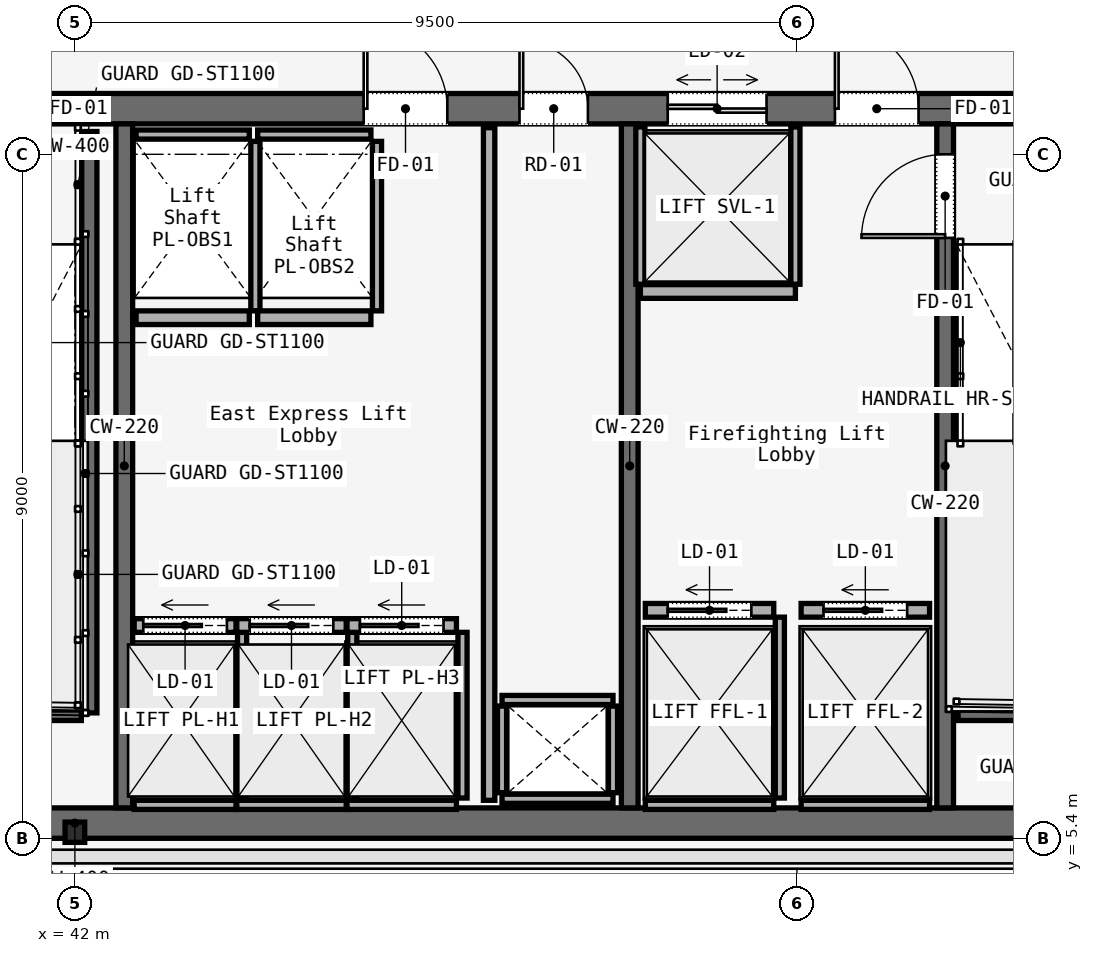
"""IFC4 building model, lengths in metres.
Left out: names, types, materials, properties, quantities, classifications, styles, units other than length and angle.
Written with IfcOpenShell. Run it as: python <this file> out.ifc"""

import sys

from ifc_helpers import new_model, si_unit, direction, frame, frame_2d, origin, origin_2d, place, context, subcontext, project, spatial, rectangle, i_section, extrude, element, fill, save


model = new_model("IFC4")
c1 = context("Model", 3, precision=1e-05, world=origin(), true_north=direction((0.0, 1.0)))
c2 = subcontext(c1, "Body", "Model", "MODEL_VIEW")
j1 = project(units=[si_unit("LENGTHUNIT", "METRE"), si_unit("PLANEANGLEUNIT", "RADIAN")], contexts=[c1])
p1 = place(None, origin())
s1 = spatial("IfcSite", under=j1, at=p1, CompositionType="ELEMENT")
p2 = place(p1, origin())
s2 = spatial("IfcBuilding", under=s1, at=p2, CompositionType="ELEMENT")
p3 = place(p2, frame((0.0, 0.0, 283.3)))
s3 = spatial("IfcBuildingStorey", under=s2, at=p3, CompositionType="ELEMENT", Elevation=283.3)
p4 = place(p3, frame((26.45, 15.0, 0.0), z_axis=(0.0, 0.0, 1.0), x_axis=(1.0, 0.0, 0.0)))
e1 = element("IfcWall", 1, at=p4, inside=s3, PredefinedType="SOLIDWALL", context=c2, shape_type="SweptSolid", body=[
    extrude(rectangle(XDim=31.1, YDim=0.4, at=frame_2d((15.55, 0.0))), origin(), (0.0, 0.0, 1.0), 3.58),
])
p5 = place(p4, frame((1.65, 0.0, 0.0)))
e2 = element("IfcOpeningElement", 2, at=p5, cuts=e1, PredefinedType="OPENING", context=c2, shape_type="SweptSolid", body=[
    extrude(rectangle(XDim=1.1, YDim=2.2, at=frame_2d((0.55, 1.1))), frame((0.0, 0.2, 0.0), z_axis=(0.0, -1.0, 0.0), x_axis=(1.0, 0.0, 0.0)), (0.0, 0.0, 1.0), 0.4),
])
p6 = place(p4, frame((13.65, 0.0, 0.0)))
e3 = element("IfcOpeningElement", 3, at=p6, cuts=e1, PredefinedType="OPENING", context=c2, shape_type="SweptSolid", body=[
    extrude(rectangle(XDim=1.1, YDim=2.2, at=frame_2d((0.55, 1.1))), frame((0.0, 0.2, 0.0), z_axis=(0.0, -1.0, 0.0), x_axis=(1.0, 0.0, 0.0)), (0.0, 0.0, 1.0), 0.4),
])
p7 = place(p4, frame((25.55, 0.0, 0.0)))
e4 = element("IfcOpeningElement", 4, at=p7, cuts=e1, PredefinedType="OPENING", context=c2, shape_type="SweptSolid", body=[
    extrude(rectangle(XDim=1.1, YDim=2.2, at=frame_2d((0.55, 1.1))), frame((0.0, 0.2, 0.0), z_axis=(0.0, -1.0, 0.0), x_axis=(1.0, 0.0, 0.0)), (0.0, 0.0, 1.0), 0.4),
])
p8 = place(p4, frame((19.35, 0.0, 0.0)))
e5 = element("IfcOpeningElement", 5, at=p8, cuts=e1, PredefinedType="OPENING", context=c2, shape_type="SweptSolid", body=[
    extrude(rectangle(XDim=1.1, YDim=2.2, at=frame_2d((0.55, 1.1))), frame((0.0, 0.2, 0.0), z_axis=(0.0, -1.0, 0.0), x_axis=(1.0, 0.0, 0.0)), (0.0, 0.0, 1.0), 0.4),
])
p9 = place(p4, frame((21.4, 0.0, 0.0)))
e6 = element("IfcOpeningElement", 6, at=p9, cuts=e1, PredefinedType="OPENING", context=c2, shape_type="SweptSolid", body=[
    extrude(rectangle(XDim=0.9, YDim=2.1, at=frame_2d((0.45, 1.05))), frame((0.0, 0.2, 0.0), z_axis=(0.0, -1.0, 0.0), x_axis=(1.0, 0.0, 0.0)), (0.0, 0.0, 1.0), 0.4),
])
p10 = place(p4, frame((6.54, 0.0, 0.0)))
e7 = element("IfcOpeningElement", 7, at=p10, cuts=e1, PredefinedType="OPENING", context=c2, shape_type="SweptSolid", body=[
    extrude(rectangle(XDim=0.95, YDim=2.2, at=frame_2d((0.475, 1.1))), frame((0.0, 0.2, 0.0), z_axis=(0.0, -1.0, 0.0), x_axis=(1.0, 0.0, 0.0)), (0.0, 0.0, 1.0), 0.4),
])
p11 = place(p4, frame((10.49, 0.0, 0.0)))
e8 = element("IfcOpeningElement", 8, at=p11, cuts=e1, PredefinedType="OPENING", context=c2, shape_type="SweptSolid", body=[
    extrude(rectangle(XDim=0.95, YDim=2.2, at=frame_2d((0.475, 1.1))), frame((0.0, 0.2, 0.0), z_axis=(0.0, -1.0, 0.0), x_axis=(1.0, 0.0, 0.0)), (0.0, 0.0, 1.0), 0.4),
])
p12 = place(p4, frame((23.35, 0.0, 0.0)))
e9 = element("IfcOpeningElement", 9, at=p12, cuts=e1, PredefinedType="OPENING", context=c2, shape_type="SweptSolid", body=[
    extrude(rectangle(XDim=1.3, YDim=2.3, at=frame_2d((0.65, 1.15))), frame((0.0, 0.2, 0.0), z_axis=(0.0, -1.0, 0.0), x_axis=(1.0, 0.0, 0.0)), (0.0, 0.0, 1.0), 0.4),
])
p13 = place(p3, frame((26.45, 5.6, 0.0), z_axis=(0.0, 0.0, 1.0), x_axis=(1.0, 0.0, 0.0)))
e10 = element("IfcWall", 10, at=p13, inside=s3, PredefinedType="SOLIDWALL", context=c2, shape_type="SweptSolid", body=[
    extrude(rectangle(XDim=31.1, YDim=0.4, at=frame_2d((15.55, 0.0))), origin(), (0.0, 0.0, 1.0), 3.58),
])
for number, where, z_axis, x_axis in (
    (11, (42.65, 5.8, 0.0), (0.0, 0.0, 1.0), (0.0, 1.0, 0.0)),
    (12, (49.3, 5.8, 0.0), (0.0, 0.0, 1.0), (0.0, 1.0, 0.0)),
):
    element("IfcWall", number, at=place(p3, frame(where, z_axis=z_axis, x_axis=x_axis)), inside=s3, PredefinedType="SOLIDWALL", context=c2, shape_type="SweptSolid", body=[
        extrude(rectangle(XDim=9.0, YDim=0.22, at=frame_2d((4.5, 0.0))), origin(), (0.0, 0.0, 1.0), 3.58),
    ])
p14 = place(p3, frame((53.45, 5.8, 0.0), z_axis=(0.0, 0.0, 1.0), x_axis=(0.0, 1.0, 0.0)))
e13 = element("IfcWall", 13, at=p14, inside=s3, PredefinedType="SOLIDWALL", context=c2, shape_type="SweptSolid", body=[
    extrude(rectangle(XDim=9.0, YDim=0.22, at=frame_2d((4.5, 0.0))), origin(), (0.0, 0.0, 1.0), 3.58),
])
p15 = place(p14, frame((7.5, 0.0, 0.0)))
e14 = element("IfcOpeningElement", 14, at=p15, cuts=e13, PredefinedType="OPENING", context=c2, shape_type="SweptSolid", body=[
    extrude(rectangle(XDim=1.1, YDim=2.2, at=frame_2d((0.55, 1.1))), frame((0.0, 0.11, 0.0), z_axis=(0.0, -1.0, 0.0), x_axis=(1.0, 0.0, 0.0)), (0.0, 0.0, 1.0), 0.22),
])
p16 = place(p3, frame((42.0, 5.48, 0.0), z_axis=(0.0, 0.0, 1.0), x_axis=(1.0, 0.0, 0.0)))
e15 = element("IfcColumn", 15, at=p16, inside=s3, PredefinedType="COLUMN", context=c2, shape_type="SweptSolid", body=[
    extrude(i_section(OverallWidth=0.259, OverallDepth=0.267, WebThickness=0.013, FlangeThickness=0.021, FilletRadius=0.013, at=origin_2d()), origin(), (0.0, 0.0, 1.0), 3.58),
])
p17 = place(p3, frame((42.19, 14.7, 0.0), z_axis=(0.0, 0.0, 1.0), x_axis=(0.0, -1.0, 0.0)))
e16 = element("IfcWall", 16, at=p17, inside=s3, PredefinedType="SOLIDWALL", context=c2, shape_type="SweptSolid", body=[
    extrude(rectangle(XDim=7.65, YDim=0.2, at=frame_2d((3.825, 0.0))), origin(), (0.0, 0.0, 1.0), 3.8),
])
for number, where, z_axis, x_axis in (
    (17, (38.97, 7.05, 0.0), (0.0, 0.0, 1.0), (1.0, 0.0, 0.0)),
    (18, (53.62, 7.05, 0.0), (0.0, 0.0, 1.0), (1.0, 0.0, 0.0)),
):
    element("IfcWall", number, at=place(p3, frame(where, z_axis=z_axis, x_axis=x_axis)), inside=s3, PredefinedType="SOLIDWALL", context=c2, shape_type="SweptSolid", body=[
        extrude(rectangle(XDim=3.115, YDim=0.2, at=frame_2d((1.558, 0.0))), origin(), (0.0, 0.0, 1.0), 3.8),
    ])
for number, where, z_axis, x_axis in (
    (19, (47.62, 5.92, 0.0), (0.0, 0.0, 1.0), (1.0, 0.0, 0.0)),
    (20, (47.62, 7.22, 0.0), (0.0, 0.0, 1.0), (1.0, 0.0, 0.0)),
):
    element("IfcWall", number, at=place(p3, frame(where, z_axis=z_axis, x_axis=x_axis)), inside=s3, PredefinedType="SOLIDWALL", context=c2, shape_type="SweptSolid", body=[
        extrude(rectangle(XDim=1.46, YDim=0.12, at=frame_2d((0.73, 0.0))), origin(), (0.0, 0.0, 1.0), 3.01),
    ])
for number, where, z_axis, x_axis in (
    (21, (47.62, 6.0, 0.0), (0.0, 0.0, 1.0), (0.0, 1.0, 0.0)),
    (22, (49.08, 6.0, 0.0), (0.0, 0.0, 1.0), (0.0, 1.0, 0.0)),
):
    element("IfcWall", number, at=place(p3, frame(where, z_axis=z_axis, x_axis=x_axis)), inside=s3, PredefinedType="SOLIDWALL", context=c2, shape_type="SweptSolid", body=[
        extrude(rectangle(XDim=1.14, YDim=0.12, at=frame_2d((0.57, 0.0))), origin(), (0.0, 0.0, 1.0), 3.01),
    ])
p18 = place(p3, frame((47.45, 5.9, 0.0), z_axis=(0.0, 0.0, 1.0), x_axis=(0.0, 1.0, 0.0)))
e23 = element("IfcWall", 23, at=p18, inside=s3, PredefinedType="PARTITIONING", context=c2, shape_type="SweptSolid", body=[
    extrude(rectangle(XDim=8.85, YDim=0.15, at=frame_2d((4.425, 0.0))), origin(), (0.0, 0.0, 1.0), 3.01),
])
p19 = place(p3, frame((42.78, 8.2, 0.0), z_axis=(0.0, 0.0, 1.0), x_axis=(1.0, 0.0, 0.0)))
e24 = element("IfcWall", 24, at=p19, inside=s3, PredefinedType="SOLIDWALL", context=c2, shape_type="SweptSolid", body=[
    extrude(rectangle(XDim=1.34, YDim=0.18, at=frame_2d((0.67, 0.0))), origin(), (0.0, 0.0, 1.0), 3.01),
])
p20 = place(p19, frame((0.12, 0.0, 0.0)))
e25 = element("IfcOpeningElement", 25, at=p20, cuts=e24, PredefinedType="OPENING", context=c2, shape_type="SweptSolid", body=[
    extrude(rectangle(XDim=1.1, YDim=2.2, at=frame_2d((0.55, 1.1))), frame((0.0, 0.09, 0.0), z_axis=(0.0, -1.0, 0.0), x_axis=(1.0, 0.0, 0.0)), (0.0, 0.0, 1.0), 0.18),
])
p21 = place(p3, frame((42.78, 5.84, 0.0), z_axis=(0.0, 0.0, 1.0), x_axis=(1.0, 0.0, 0.0)))
e26 = element("IfcWall", 26, at=p21, inside=s3, PredefinedType="SOLIDWALL", context=c2, shape_type="SweptSolid", body=[
    extrude(rectangle(XDim=1.34, YDim=0.12, at=frame_2d((0.67, 0.0))), origin(), (0.0, 0.0, 1.0), 3.01),
])
p22 = place(p3, frame((44.2, 5.93, 0.0), z_axis=(0.0, 0.0, 1.0), x_axis=(0.0, 1.0, 0.0)))
e27 = element("IfcWall", 27, at=p22, inside=s3, PredefinedType="SOLIDWALL", context=c2, shape_type="SweptSolid", body=[
    extrude(rectangle(XDim=2.18, YDim=0.12, at=frame_2d((1.09, 0.0))), origin(), (0.0, 0.0, 1.0), 3.01),
])
p23 = place(p3, frame((44.13, 8.2, 0.0), z_axis=(0.0, 0.0, 1.0), x_axis=(1.0, 0.0, 0.0)))
e28 = element("IfcWall", 28, at=p23, inside=s3, PredefinedType="SOLIDWALL", context=c2, shape_type="SweptSolid", body=[
    extrude(rectangle(XDim=1.44, YDim=0.18, at=frame_2d((0.72, 0.0))), origin(), (0.0, 0.0, 1.0), 3.01),
])
p24 = place(p23, frame((0.17, 0.0, 0.0)))
e29 = element("IfcOpeningElement", 29, at=p24, cuts=e28, PredefinedType="OPENING", context=c2, shape_type="SweptSolid", body=[
    extrude(rectangle(XDim=1.1, YDim=2.2, at=frame_2d((0.55, 1.1))), frame((0.0, 0.09, 0.0), z_axis=(0.0, -1.0, 0.0), x_axis=(1.0, 0.0, 0.0)), (0.0, 0.0, 1.0), 0.18),
])
p25 = place(p3, frame((44.13, 5.84, 0.0), z_axis=(0.0, 0.0, 1.0), x_axis=(1.0, 0.0, 0.0)))
e30 = element("IfcWall", 30, at=p25, inside=s3, PredefinedType="SOLIDWALL", context=c2, shape_type="SweptSolid", body=[
    extrude(rectangle(XDim=1.44, YDim=0.12, at=frame_2d((0.72, 0.0))), origin(), (0.0, 0.0, 1.0), 3.01),
])
p26 = place(p3, frame((45.65, 5.93, 0.0), z_axis=(0.0, 0.0, 1.0), x_axis=(0.0, 1.0, 0.0)))
e31 = element("IfcWall", 31, at=p26, inside=s3, PredefinedType="SOLIDWALL", context=c2, shape_type="SweptSolid", body=[
    extrude(rectangle(XDim=2.18, YDim=0.12, at=frame_2d((1.09, 0.0))), origin(), (0.0, 0.0, 1.0), 3.01),
])
p27 = place(p3, frame((45.58, 8.2, 0.0), z_axis=(0.0, 0.0, 1.0), x_axis=(1.0, 0.0, 0.0)))
e32 = element("IfcWall", 32, at=p27, inside=s3, PredefinedType="SOLIDWALL", context=c2, shape_type="SweptSolid", body=[
    extrude(rectangle(XDim=1.44, YDim=0.18, at=frame_2d((0.72, 0.0))), origin(), (0.0, 0.0, 1.0), 3.01),
])
p28 = place(p27, frame((0.17, 0.0, 0.0)))
e33 = element("IfcOpeningElement", 33, at=p28, cuts=e32, PredefinedType="OPENING", context=c2, shape_type="SweptSolid", body=[
    extrude(rectangle(XDim=1.1, YDim=2.2, at=frame_2d((0.55, 1.1))), frame((0.0, 0.09, 0.0), z_axis=(0.0, -1.0, 0.0), x_axis=(1.0, 0.0, 0.0)), (0.0, 0.0, 1.0), 0.18),
])
p29 = place(p3, frame((45.58, 5.84, 0.0), z_axis=(0.0, 0.0, 1.0), x_axis=(1.0, 0.0, 0.0)))
e34 = element("IfcWall", 34, at=p29, inside=s3, PredefinedType="SOLIDWALL", context=c2, shape_type="SweptSolid", body=[
    extrude(rectangle(XDim=1.44, YDim=0.12, at=frame_2d((0.72, 0.0))), origin(), (0.0, 0.0, 1.0), 3.01),
])
p30 = place(p3, frame((47.1, 5.93, 0.0), z_axis=(0.0, 0.0, 1.0), x_axis=(0.0, 1.0, 0.0)))
e35 = element("IfcWall", 35, at=p30, inside=s3, PredefinedType="SOLIDWALL", context=c2, shape_type="SweptSolid", body=[
    extrude(rectangle(XDim=2.18, YDim=0.12, at=frame_2d((1.09, 0.0))), origin(), (0.0, 0.0, 1.0), 3.01),
])
p31 = place(p3, frame((42.805, 12.25, 0.0), z_axis=(0.0, 0.0, 1.0), x_axis=(1.0, 0.0, 0.0)))
e36 = element("IfcWall", 36, at=p31, inside=s3, PredefinedType="SOLIDWALL", context=c2, shape_type="SweptSolid", body=[
    extrude(rectangle(XDim=1.49, YDim=0.18, at=frame_2d((0.745, 0.0))), origin(), (0.0, 0.0, 1.0), 3.01),
])
p32 = place(p3, frame((42.805, 14.66, 0.0), z_axis=(0.0, 0.0, 1.0), x_axis=(1.0, 0.0, 0.0)))
e37 = element("IfcWall", 37, at=p32, inside=s3, PredefinedType="SOLIDWALL", context=c2, shape_type="SweptSolid", body=[
    extrude(rectangle(XDim=1.49, YDim=0.12, at=frame_2d((0.745, 0.0))), origin(), (0.0, 0.0, 1.0), 3.01),
])
p33 = place(p3, frame((44.375, 12.34, 0.0), z_axis=(0.0, 0.0, 1.0), x_axis=(0.0, 1.0, 0.0)))
e38 = element("IfcWall", 38, at=p33, inside=s3, PredefinedType="SOLIDWALL", context=c2, shape_type="SweptSolid", body=[
    extrude(rectangle(XDim=2.23, YDim=0.12, at=frame_2d((1.115, 0.0))), origin(), (0.0, 0.0, 1.0), 3.01),
])
p34 = place(p3, frame((44.405, 12.25, 0.0), z_axis=(0.0, 0.0, 1.0), x_axis=(1.0, 0.0, 0.0)))
e39 = element("IfcWall", 39, at=p34, inside=s3, PredefinedType="SOLIDWALL", context=c2, shape_type="SweptSolid", body=[
    extrude(rectangle(XDim=1.49, YDim=0.18, at=frame_2d((0.745, 0.0))), origin(), (0.0, 0.0, 1.0), 3.01),
])
p35 = place(p3, frame((44.405, 14.66, 0.0), z_axis=(0.0, 0.0, 1.0), x_axis=(1.0, 0.0, 0.0)))
e40 = element("IfcWall", 40, at=p35, inside=s3, PredefinedType="SOLIDWALL", context=c2, shape_type="SweptSolid", body=[
    extrude(rectangle(XDim=1.49, YDim=0.12, at=frame_2d((0.745, 0.0))), origin(), (0.0, 0.0, 1.0), 3.01),
])
p36 = place(p3, frame((45.975, 12.34, 0.0), z_axis=(0.0, 0.0, 1.0), x_axis=(0.0, 1.0, 0.0)))
e41 = element("IfcWall", 41, at=p36, inside=s3, PredefinedType="SOLIDWALL", context=c2, shape_type="SweptSolid", body=[
    extrude(rectangle(XDim=2.23, YDim=0.12, at=frame_2d((1.115, 0.0))), origin(), (0.0, 0.0, 1.0), 3.01),
])
p37 = place(p3, frame((49.505, 8.4, 0.0), z_axis=(0.0, 0.0, 1.0), x_axis=(1.0, 0.0, 0.0)))
e42 = element("IfcWall", 42, at=p37, inside=s3, PredefinedType="SOLIDWALL", context=c2, shape_type="SweptSolid", body=[
    extrude(rectangle(XDim=1.69, YDim=0.18, at=frame_2d((0.845, 0.0))), origin(), (0.0, 0.0, 1.0), 3.01),
])
p38 = place(p37, frame((0.295, 0.0, 0.0)))
e43 = element("IfcOpeningElement", 43, at=p38, cuts=e42, PredefinedType="OPENING", context=c2, shape_type="SweptSolid", body=[
    extrude(rectangle(XDim=1.1, YDim=2.2, at=frame_2d((0.55, 1.1))), frame((0.0, 0.09, 0.0), z_axis=(0.0, -1.0, 0.0), x_axis=(1.0, 0.0, 0.0)), (0.0, 0.0, 1.0), 0.18),
])
p39 = place(p3, frame((49.505, 5.84, 0.0), z_axis=(0.0, 0.0, 1.0), x_axis=(1.0, 0.0, 0.0)))
e44 = element("IfcWall", 44, at=p39, inside=s3, PredefinedType="SOLIDWALL", context=c2, shape_type="SweptSolid", body=[
    extrude(rectangle(XDim=1.69, YDim=0.12, at=frame_2d((0.845, 0.0))), origin(), (0.0, 0.0, 1.0), 3.01),
])
p40 = place(p3, frame((51.275, 5.93, 0.0), z_axis=(0.0, 0.0, 1.0), x_axis=(0.0, 1.0, 0.0)))
e45 = element("IfcWall", 45, at=p40, inside=s3, PredefinedType="SOLIDWALL", context=c2, shape_type="SweptSolid", body=[
    extrude(rectangle(XDim=2.38, YDim=0.12, at=frame_2d((1.19, 0.0))), origin(), (0.0, 0.0, 1.0), 3.01),
])
p41 = place(p3, frame((51.555, 8.4, 0.0), z_axis=(0.0, 0.0, 1.0), x_axis=(1.0, 0.0, 0.0)))
e46 = element("IfcWall", 46, at=p41, inside=s3, PredefinedType="SOLIDWALL", context=c2, shape_type="SweptSolid", body=[
    extrude(rectangle(XDim=1.69, YDim=0.18, at=frame_2d((0.845, 0.0))), origin(), (0.0, 0.0, 1.0), 3.01),
])
p42 = place(p41, frame((0.295, 0.0, 0.0)))
e47 = element("IfcOpeningElement", 47, at=p42, cuts=e46, PredefinedType="OPENING", context=c2, shape_type="SweptSolid", body=[
    extrude(rectangle(XDim=1.1, YDim=2.2, at=frame_2d((0.55, 1.1))), frame((0.0, 0.09, 0.0), z_axis=(0.0, -1.0, 0.0), x_axis=(1.0, 0.0, 0.0)), (0.0, 0.0, 1.0), 0.18),
])
p43 = place(p3, frame((51.555, 5.84, 0.0), z_axis=(0.0, 0.0, 1.0), x_axis=(1.0, 0.0, 0.0)))
e48 = element("IfcWall", 48, at=p43, inside=s3, PredefinedType="SOLIDWALL", context=c2, shape_type="SweptSolid", body=[
    extrude(rectangle(XDim=1.69, YDim=0.12, at=frame_2d((0.845, 0.0))), origin(), (0.0, 0.0, 1.0), 3.01),
])
p44 = place(p3, frame((49.44, 12.595, 0.0), z_axis=(0.0, 0.0, 1.0), x_axis=(1.0, 0.0, 0.0)))
e49 = element("IfcWall", 49, at=p44, inside=s3, PredefinedType="SOLIDWALL", context=c2, shape_type="SweptSolid", body=[
    extrude(rectangle(XDim=2.04, YDim=0.18, at=frame_2d((1.02, 0.0))), origin(), (0.0, 0.0, 1.0), 3.01),
])
for number, where, z_axis, x_axis in (
    (50, (49.44, 12.69, 0.0), (0.0, 0.0, 1.0), (0.0, 1.0, 0.0)),
    (51, (51.48, 12.69, 0.0), (0.0, 0.0, 1.0), (0.0, 1.0, 0.0)),
):
    element("IfcWall", number, at=place(p3, frame(where, z_axis=z_axis, x_axis=x_axis)), inside=s3, PredefinedType="SOLIDWALL", context=c2, shape_type="SweptSolid", body=[
        extrude(rectangle(XDim=2.07, YDim=0.12, at=frame_2d((1.035, 0.0))), origin(), (0.0, 0.0, 1.0), 3.01),
    ])
p45 = place(p7, origin())
e52 = element("IfcDoor", 52, at=p45, inside=s3, OperationType="SINGLE_SWING_RIGHT", PredefinedType="DOOR", context=c2, shape_type="SweptSolid", body=[
    extrude(rectangle(XDim=1.1, YDim=2.2, at=frame_2d((0.55, 1.1))), frame((0.0, 0.025, 0.0), z_axis=(0.0, -1.0, 0.0), x_axis=(1.0, 0.0, 0.0)), (0.0, 0.0, 1.0), 0.05),
])
fill(e4, e52)
p46 = place(p8, origin())
e53 = element("IfcDoor", 53, at=p46, inside=s3, OperationType="SINGLE_SWING_LEFT", PredefinedType="DOOR", context=c2, shape_type="SweptSolid", body=[
    extrude(rectangle(XDim=1.1, YDim=2.2, at=frame_2d((0.55, 1.1))), frame((0.0, 0.025, 0.0), z_axis=(0.0, -1.0, 0.0), x_axis=(1.0, 0.0, 0.0)), (0.0, 0.0, 1.0), 0.05),
])
fill(e5, e53)
p47 = place(p9, origin())
e54 = element("IfcDoor", 54, at=p47, inside=s3, OperationType="SINGLE_SWING_LEFT", PredefinedType="DOOR", context=c2, shape_type="SweptSolid", body=[
    extrude(rectangle(XDim=0.9, YDim=2.1, at=frame_2d((0.45, 1.05))), frame((0.0, 0.025, 0.0), z_axis=(0.0, -1.0, 0.0), x_axis=(1.0, 0.0, 0.0)), (0.0, 0.0, 1.0), 0.05),
])
fill(e6, e54)
p48 = place(p15, origin())
e55 = element("IfcDoor", 55, at=p48, inside=s3, OperationType="SINGLE_SWING_LEFT", PredefinedType="DOOR", context=c2, shape_type="SweptSolid", body=[
    extrude(rectangle(XDim=1.1, YDim=2.2, at=frame_2d((0.55, 1.1))), frame((0.0, 0.025, 0.0), z_axis=(0.0, -1.0, 0.0), x_axis=(1.0, 0.0, 0.0)), (0.0, 0.0, 1.0), 0.05),
])
fill(e14, e55)
p49 = place(p20, origin())
e56 = element("IfcDoor", 56, at=p49, inside=s3, OperationType="SLIDING_TO_LEFT", PredefinedType="DOOR", context=c2, shape_type="SweptSolid", body=[
    extrude(rectangle(XDim=1.1, YDim=2.2, at=frame_2d((0.55, 1.1))), frame((0.0, 0.025, 0.0), z_axis=(0.0, -1.0, 0.0), x_axis=(1.0, 0.0, 0.0)), (0.0, 0.0, 1.0), 0.05),
])
fill(e25, e56)
p50 = place(p24, origin())
e57 = element("IfcDoor", 57, at=p50, inside=s3, OperationType="SLIDING_TO_LEFT", PredefinedType="DOOR", context=c2, shape_type="SweptSolid", body=[
    extrude(rectangle(XDim=1.1, YDim=2.2, at=frame_2d((0.55, 1.1))), frame((0.0, 0.025, 0.0), z_axis=(0.0, -1.0, 0.0), x_axis=(1.0, 0.0, 0.0)), (0.0, 0.0, 1.0), 0.05),
])
fill(e29, e57)
p51 = place(p28, origin())
e58 = element("IfcDoor", 58, at=p51, inside=s3, OperationType="SLIDING_TO_LEFT", PredefinedType="DOOR", context=c2, shape_type="SweptSolid", body=[
    extrude(rectangle(XDim=1.1, YDim=2.2, at=frame_2d((0.55, 1.1))), frame((0.0, 0.025, 0.0), z_axis=(0.0, -1.0, 0.0), x_axis=(1.0, 0.0, 0.0)), (0.0, 0.0, 1.0), 0.05),
])
fill(e33, e58)
p52 = place(p38, origin())
e59 = element("IfcDoor", 59, at=p52, inside=s3, OperationType="SLIDING_TO_LEFT", PredefinedType="DOOR", context=c2, shape_type="SweptSolid", body=[
    extrude(rectangle(XDim=1.1, YDim=2.2, at=frame_2d((0.55, 1.1))), frame((0.0, 0.025, 0.0), z_axis=(0.0, -1.0, 0.0), x_axis=(1.0, 0.0, 0.0)), (0.0, 0.0, 1.0), 0.05),
])
fill(e43, e59)
p53 = place(p42, origin())
e60 = element("IfcDoor", 60, at=p53, inside=s3, OperationType="SLIDING_TO_LEFT", PredefinedType="DOOR", context=c2, shape_type="SweptSolid", body=[
    extrude(rectangle(XDim=1.1, YDim=2.2, at=frame_2d((0.55, 1.1))), frame((0.0, 0.025, 0.0), z_axis=(0.0, -1.0, 0.0), x_axis=(1.0, 0.0, 0.0)), (0.0, 0.0, 1.0), 0.05),
])
fill(e47, e60)
p54 = place(p12, origin())
e61 = element("IfcDoor", 61, at=p54, inside=s3, OperationType="DOUBLE_DOOR_SLIDING", PredefinedType="DOOR", context=c2, shape_type="SweptSolid", body=[
    extrude(rectangle(XDim=1.3, YDim=2.3, at=frame_2d((0.65, 1.15))), frame((0.0, 0.025, 0.0), z_axis=(0.0, -1.0, 0.0), x_axis=(1.0, 0.0, 0.0)), (0.0, 0.0, 1.0), 0.05),
])
fill(e9, e61)
save(model, sys.argv[1])
